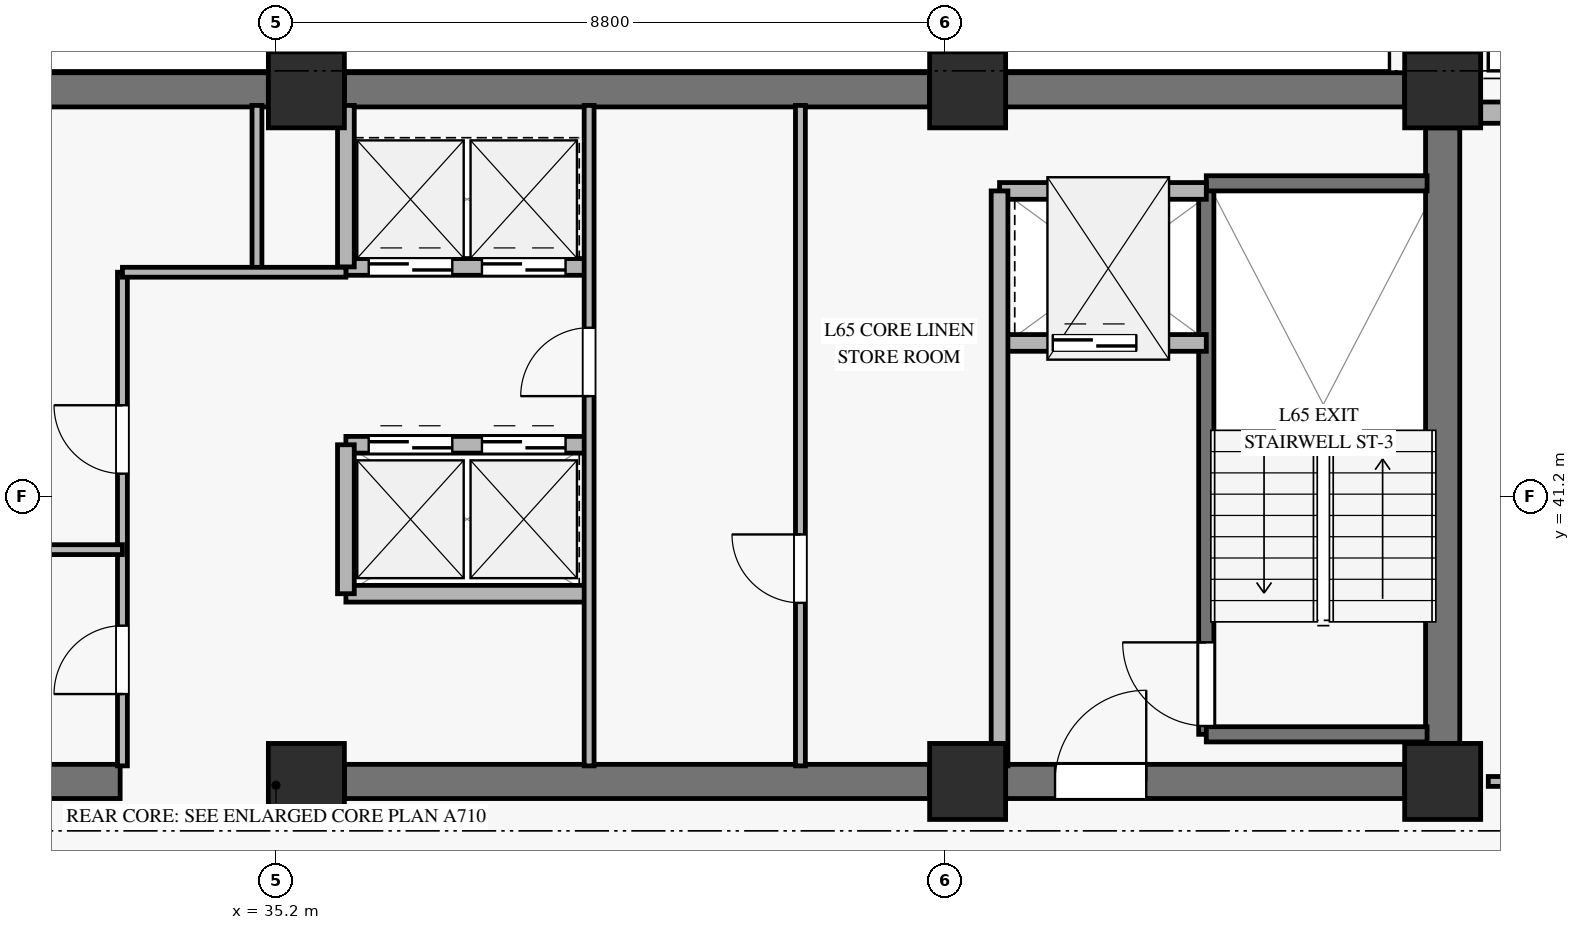
"""IFC4 building model, lengths in metres.
Left out: names, types, materials, properties, quantities, classifications, styles, units other than length and angle.
Written with IfcOpenShell. Run it as: python <this file> out.ifc"""

import sys

from ifc_helpers import new_model, si_unit, direction, frame, frame_2d, origin, origin_2d, place, context, subcontext, project, spatial, rectangle, extrude, source, transform, mapped, element, fill, save


model = new_model("IFC4")
c1 = context("Model", 3, precision=1e-05, world=origin(), true_north=direction((0.0, 1.0)))
c2 = subcontext(c1, "Body", "Model", "MODEL_VIEW")
j1 = project(units=[si_unit("LENGTHUNIT", "METRE"), si_unit("PLANEANGLEUNIT", "RADIAN")], contexts=[c1])
p1 = place(None, origin())
s1 = spatial("IfcSite", under=j1, at=p1, CompositionType="ELEMENT")
p2 = place(p1, origin())
s2 = spatial("IfcBuilding", under=s1, at=p2, CompositionType="ELEMENT")
p3 = place(p2, frame((0.0, 0.0, 255.3)))
s3 = spatial("IfcBuildingStorey", under=s2, at=p3, CompositionType="ELEMENT", Elevation=255.3)
m1 = source(origin(), c2, "Body", "SweptSolid", [
    extrude(rectangle(XDim=1.0, YDim=1.0, at=origin_2d()), origin(), (0.0, 0.0, 1.0), 3.185),
])
for number, where, z_axis, x_axis in (
    (1, (35.6, 37.45, 0.0), (0.0, 0.0, 1.0), (1.0, 0.0, 0.0)),
    (2, (35.6, 46.55, 0.0), (0.0, 0.0, 1.0), (1.0, 0.0, 0.0)),
    (3, (44.3, 37.45, 0.0), (0.0, 0.0, 1.0), (1.0, 0.0, 0.0)),
    (4, (44.3, 46.55, 0.0), (0.0, 0.0, 1.0), (1.0, 0.0, 0.0)),
    (5, (50.55, 37.45, 0.0), (0.0, 0.0, 1.0), (1.0, 0.0, 0.0)),
    (6, (50.55, 46.55, 0.0), (0.0, 0.0, 1.0), (1.0, 0.0, 0.0)),
):
    element("IfcColumn", number, at=place(p3, frame(where, z_axis=z_axis, x_axis=x_axis)), inside=s3, PredefinedType="PILASTER", context=c2, shape_type="MappedRepresentation", body=[
        mapped(m1, transform((0.0, 0.0, 0.0), x_axis=(1.0, 0.0, 0.0), y_axis=(0.0, 1.0, 0.0), z_axis=(0.0, 0.0, 1.0), scale=1.0)),
    ])
p4 = place(p3, frame((31.3, 46.55, 0.0), z_axis=(0.0, 0.0, 1.0), x_axis=(1.0, 0.0, 0.0)))
e7 = element("IfcWall", 7, at=p4, inside=s3, PredefinedType="SHEAR", context=c2, shape_type="SweptSolid", body=[
    extrude(rectangle(XDim=3.8, YDim=0.45, at=frame_2d((1.9, 0.0))), origin(), (0.0, 0.0, 1.0), 3.185),
])
p5 = place(p3, frame((36.1, 46.55, 0.0), z_axis=(0.0, 0.0, 1.0), x_axis=(1.0, 0.0, 0.0)))
e8 = element("IfcWall", 8, at=p5, inside=s3, PredefinedType="SHEAR", context=c2, shape_type="SweptSolid", body=[
    extrude(rectangle(XDim=7.7, YDim=0.45, at=frame_2d((3.85, 0.0))), origin(), (0.0, 0.0, 1.0), 3.185),
])
p6 = place(p3, frame((44.8, 46.55, 0.0), z_axis=(0.0, 0.0, 1.0), x_axis=(1.0, 0.0, 0.0)))
e9 = element("IfcWall", 9, at=p6, inside=s3, PredefinedType="SHEAR", context=c2, shape_type="SweptSolid", body=[
    extrude(rectangle(XDim=5.25, YDim=0.45, at=frame_2d((2.625, 0.0))), origin(), (0.0, 0.0, 1.0), 3.185),
])
p7 = place(p3, frame((31.3, 37.45, 0.0), z_axis=(0.0, 0.0, 1.0), x_axis=(1.0, 0.0, 0.0)))
e10 = element("IfcWall", 10, at=p7, inside=s3, PredefinedType="SHEAR", context=c2, shape_type="SweptSolid", body=[
    extrude(rectangle(XDim=1.85, YDim=0.45, at=frame_2d((0.925, 0.0))), origin(), (0.0, 0.0, 1.0), 3.185),
])
p8 = place(p3, frame((36.1, 37.45, 0.0), z_axis=(0.0, 0.0, 1.0), x_axis=(1.0, 0.0, 0.0)))
e11 = element("IfcWall", 11, at=p8, inside=s3, PredefinedType="SHEAR", context=c2, shape_type="SweptSolid", body=[
    extrude(rectangle(XDim=7.7, YDim=0.45, at=frame_2d((3.85, 0.0))), origin(), (0.0, 0.0, 1.0), 3.185),
])
p9 = place(p3, frame((44.8, 37.45, 0.0), z_axis=(0.0, 0.0, 1.0), x_axis=(1.0, 0.0, 0.0)))
e12 = element("IfcWall", 12, at=p9, inside=s3, PredefinedType="SHEAR", context=c2, shape_type="SweptSolid", body=[
    extrude(rectangle(XDim=5.25, YDim=0.45, at=frame_2d((2.625, 0.0))), origin(), (0.0, 0.0, 1.0), 3.185),
])
p10 = place(p9, frame((0.65, 0.0, 0.0)))
e13 = element("IfcOpeningElement", 13, at=p10, cuts=e12, PredefinedType="OPENING", context=c2, shape_type="SweptSolid", body=[
    extrude(rectangle(XDim=1.2, YDim=2.15, at=frame_2d((0.6, 1.075))), frame((0.0, 0.235, 0.0), z_axis=(0.0, -1.0, 0.0), x_axis=(1.0, 0.0, 0.0)), (0.0, 0.0, 1.0), 0.47),
])
p11 = place(p3, frame((50.55, 37.95, 0.0), z_axis=(0.0, 0.0, 1.0), x_axis=(0.0, 1.0, 0.0)))
e14 = element("IfcWall", 14, at=p11, inside=s3, PredefinedType="SHEAR", context=c2, shape_type="SweptSolid", body=[
    extrude(rectangle(XDim=8.1, YDim=0.45, at=frame_2d((4.05, 0.0))), origin(), (0.0, 0.0, 1.0), 3.185),
])
p12 = place(p3, frame((51.05, 46.25, 0.0), z_axis=(0.0, 0.0, 1.0), x_axis=(1.0, 0.0, 0.0)))
e15 = element("IfcWall", 15, at=p12, inside=s3, PredefinedType="SOLIDWALL", context=c2, shape_type="SweptSolid", body=[
    extrude(rectangle(XDim=8.122, YDim=0.28, at=frame_2d((4.061, 0.0))), origin(), (0.0, 0.0, 1.0), 2.815),
])
p13 = place(p12, frame((3.261, 0.0, 0.45)))
e16 = element("IfcOpeningElement", 16, at=p13, cuts=e15, PredefinedType="OPENING", context=c2, shape_type="SweptSolid", body=[
    extrude(rectangle(XDim=1.6, YDim=2.0, at=frame_2d((0.8, 1.0))), frame((0.0, 0.15, 0.0), z_axis=(0.0, -1.0, 0.0), x_axis=(1.0, 0.0, 0.0)), (0.0, 0.0, 1.0), 0.3),
])
p14 = place(p3, frame((47.44, 38.07, 0.0), z_axis=(0.0, 0.0, 1.0), x_axis=(0.0, 1.0, 0.0)))
e17 = element("IfcWall", 17, at=p14, inside=s3, PredefinedType="SOLIDWALL", context=c2, shape_type="SweptSolid", body=[
    extrude(rectangle(XDim=7.25, YDim=0.2, at=frame_2d((3.625, 0.0))), origin(), (0.0, 0.0, 1.0), 3.4),
])
p15 = place(p14, frame((0.11, 0.0, 0.0)))
e18 = element("IfcOpeningElement", 18, at=p15, cuts=e17, PredefinedType="OPENING", context=c2, shape_type="SweptSolid", body=[
    extrude(rectangle(XDim=1.1, YDim=2.15, at=frame_2d((0.55, 1.075))), frame((0.0, 0.11, 0.0), z_axis=(0.0, -1.0, 0.0), x_axis=(1.0, 0.0, 0.0)), (0.0, 0.0, 1.0), 0.22),
])
for number, where, z_axis, x_axis in (
    (19, (47.44, 45.32, 0.0), (0.0, 0.0, 1.0), (1.0, 0.0, 0.0)),
    (20, (47.44, 38.07, 0.0), (0.0, 0.0, 1.0), (1.0, 0.0, 0.0)),
):
    element("IfcWall", number, at=place(p3, frame(where, z_axis=z_axis, x_axis=x_axis)), inside=s3, PredefinedType="SOLIDWALL", context=c2, shape_type="SweptSolid", body=[
        extrude(rectangle(XDim=2.905, YDim=0.2, at=frame_2d((1.453, 0.0))), origin(), (0.0, 0.0, 1.0), 3.4),
    ])
p16 = place(p3, frame((44.72, 43.22, 0.0), z_axis=(0.0, 0.0, 1.0), x_axis=(1.0, 0.0, 0.0)))
e21 = element("IfcWall", 21, at=p16, inside=s3, PredefinedType="SOLIDWALL", context=c2, shape_type="SweptSolid", body=[
    extrude(rectangle(XDim=2.72, YDim=0.22, at=frame_2d((1.36, 0.0))), origin(), (0.0, 0.0, 1.0), 3.185),
])
p17 = place(p16, frame((0.7, 0.0, 0.0)))
e22 = element("IfcOpeningElement", 22, at=p17, cuts=e21, PredefinedType="OPENING", context=c2, shape_type="SweptSolid", body=[
    extrude(rectangle(XDim=1.1, YDim=2.2, at=frame_2d((0.55, 1.1))), frame((0.0, 0.12, 0.0), z_axis=(0.0, -1.0, 0.0), x_axis=(1.0, 0.0, 0.0)), (0.0, 0.0, 1.0), 0.24),
])
p18 = place(p3, frame((44.72, 45.22, 0.0), z_axis=(0.0, 0.0, 1.0), x_axis=(1.0, 0.0, 0.0)))
e23 = element("IfcWall", 23, at=p18, inside=s3, PredefinedType="SOLIDWALL", context=c2, shape_type="SweptSolid", body=[
    extrude(rectangle(XDim=2.72, YDim=0.22, at=frame_2d((1.36, 0.0))), origin(), (0.0, 0.0, 1.0), 3.185),
])
p19 = place(p3, frame((44.72, 37.655, 0.0), z_axis=(0.0, 0.0, 1.0), x_axis=(0.0, 1.0, 0.0)))
e24 = element("IfcWall", 24, at=p19, inside=s3, PredefinedType="SOLIDWALL", context=c2, shape_type="SweptSolid", body=[
    extrude(rectangle(XDim=7.565, YDim=0.22, at=frame_2d((3.782, 0.0))), origin(), (0.0, 0.0, 1.0), 3.185),
])
p20 = place(p3, frame((36.12, 44.22, 0.0), z_axis=(0.0, 0.0, 1.0), x_axis=(1.0, 0.0, 0.0)))
e25 = element("IfcWall", 25, at=p20, inside=s3, PredefinedType="SOLIDWALL", context=c2, shape_type="SweptSolid", body=[
    extrude(rectangle(XDim=3.2, YDim=0.22, at=frame_2d((1.6, 0.0))), origin(), (0.0, 0.0, 1.0), 3.185),
])
p21 = place(p20, frame((0.3, 0.0, 0.0)))
e26 = element("IfcOpeningElement", 26, at=p21, cuts=e25, PredefinedType="OPENING", context=c2, shape_type="SweptSolid", body=[
    extrude(rectangle(XDim=1.1, YDim=2.2, at=frame_2d((0.55, 1.1))), frame((0.0, 0.12, 0.0), z_axis=(0.0, -1.0, 0.0), x_axis=(1.0, 0.0, 0.0)), (0.0, 0.0, 1.0), 0.24),
])
p22 = place(p20, frame((1.79, 0.0, 0.0)))
e27 = element("IfcOpeningElement", 27, at=p22, cuts=e25, PredefinedType="OPENING", context=c2, shape_type="SweptSolid", body=[
    extrude(rectangle(XDim=1.1, YDim=2.2, at=frame_2d((0.55, 1.1))), frame((0.0, 0.12, 0.0), z_axis=(0.0, -1.0, 0.0), x_axis=(1.0, 0.0, 0.0)), (0.0, 0.0, 1.0), 0.24),
])
p23 = place(p3, frame((36.12, 41.88, 0.0), z_axis=(0.0, 0.0, 1.0), x_axis=(1.0, 0.0, 0.0)))
e28 = element("IfcWall", 28, at=p23, inside=s3, PredefinedType="SOLIDWALL", context=c2, shape_type="SweptSolid", body=[
    extrude(rectangle(XDim=3.2, YDim=0.22, at=frame_2d((1.6, 0.0))), origin(), (0.0, 0.0, 1.0), 3.185),
])
p24 = place(p23, frame((0.3, 0.0, 0.0)))
e29 = element("IfcOpeningElement", 29, at=p24, cuts=e28, PredefinedType="OPENING", context=c2, shape_type="SweptSolid", body=[
    extrude(rectangle(XDim=1.1, YDim=2.2, at=frame_2d((0.55, 1.1))), frame((0.0, 0.12, 0.0), z_axis=(0.0, -1.0, 0.0), x_axis=(1.0, 0.0, 0.0)), (0.0, 0.0, 1.0), 0.24),
])
p25 = place(p23, frame((1.79, 0.0, 0.0)))
e30 = element("IfcOpeningElement", 30, at=p25, cuts=e28, PredefinedType="OPENING", context=c2, shape_type="SweptSolid", body=[
    extrude(rectangle(XDim=1.1, YDim=2.2, at=frame_2d((0.55, 1.1))), frame((0.0, 0.12, 0.0), z_axis=(0.0, -1.0, 0.0), x_axis=(1.0, 0.0, 0.0)), (0.0, 0.0, 1.0), 0.24),
])
p26 = place(p3, frame((36.12, 39.92, 0.0), z_axis=(0.0, 0.0, 1.0), x_axis=(1.0, 0.0, 0.0)))
e31 = element("IfcWall", 31, at=p26, inside=s3, PredefinedType="SOLIDWALL", context=c2, shape_type="SweptSolid", body=[
    extrude(rectangle(XDim=3.2, YDim=0.22, at=frame_2d((1.6, 0.0))), origin(), (0.0, 0.0, 1.0), 3.185),
])
p27 = place(p3, frame((36.12, 39.92, 0.0), z_axis=(0.0, 0.0, 1.0), x_axis=(0.0, 1.0, 0.0)))
e32 = element("IfcWall", 32, at=p27, inside=s3, PredefinedType="SOLIDWALL", context=c2, shape_type="SweptSolid", body=[
    extrude(rectangle(XDim=1.96, YDim=0.22, at=frame_2d((0.98, 0.0))), origin(), (0.0, 0.0, 1.0), 3.185),
])
p28 = place(p3, frame((36.12, 44.22, 0.0), z_axis=(0.0, 0.0, 1.0), x_axis=(0.0, 1.0, 0.0)))
e33 = element("IfcWall", 33, at=p28, inside=s3, PredefinedType="SOLIDWALL", context=c2, shape_type="SweptSolid", body=[
    extrude(rectangle(XDim=2.125, YDim=0.22, at=frame_2d((1.062, 0.0))), origin(), (0.0, 0.0, 1.0), 3.185),
])
p29 = place(p3, frame((33.18, 37.655, 0.0), z_axis=(0.0, 0.0, 1.0), x_axis=(0.0, 1.0, 0.0)))
e34 = element("IfcWall", 34, at=p29, inside=s3, PredefinedType="PARTITIONING", context=c2, shape_type="SweptSolid", body=[
    extrude(rectangle(XDim=6.495, YDim=0.13, at=frame_2d((3.248, 0.0))), origin(), (0.0, 0.0, 1.0), 2.27),
])
p30 = place(p29, frame((0.945, 0.0, 0.0)))
e35 = element("IfcOpeningElement", 35, at=p30, cuts=e34, PredefinedType="OPENING", context=c2, shape_type="SweptSolid", body=[
    extrude(rectangle(XDim=0.9, YDim=2.1, at=frame_2d((0.45, 1.05))), frame((0.0, 0.075, 0.0), z_axis=(0.0, -1.0, 0.0), x_axis=(1.0, 0.0, 0.0)), (0.0, 0.0, 1.0), 0.15),
])
p31 = place(p29, frame((3.845, 0.0, 0.0)))
e36 = element("IfcOpeningElement", 36, at=p31, cuts=e34, PredefinedType="OPENING", context=c2, shape_type="SweptSolid", body=[
    extrude(rectangle(XDim=0.9, YDim=2.1, at=frame_2d((0.45, 1.05))), frame((0.0, 0.075, 0.0), z_axis=(0.0, -1.0, 0.0), x_axis=(1.0, 0.0, 0.0)), (0.0, 0.0, 1.0), 0.15),
])
p32 = place(p3, frame((34.95, 44.15, 0.0), z_axis=(0.0, 0.0, 1.0), x_axis=(0.0, 1.0, 0.0)))
e37 = element("IfcWall", 37, at=p32, inside=s3, PredefinedType="PARTITIONING", context=c2, shape_type="SweptSolid", body=[
    extrude(rectangle(XDim=2.195, YDim=0.13, at=frame_2d((1.098, 0.0))), origin(), (0.0, 0.0, 1.0), 3.185),
])
p33 = place(p3, frame((33.18, 44.15, 0.0), z_axis=(0.0, 0.0, 1.0), x_axis=(1.0, 0.0, 0.0)))
e38 = element("IfcWall", 38, at=p33, inside=s3, PredefinedType="PARTITIONING", context=c2, shape_type="SweptSolid", body=[
    extrude(rectangle(XDim=2.94, YDim=0.13, at=frame_2d((1.47, 0.0))), origin(), (0.0, 0.0, 1.0), 2.47),
])
p34 = place(p3, frame((39.32, 37.655, 0.0), z_axis=(0.0, 0.0, 1.0), x_axis=(0.0, 1.0, 0.0)))
e39 = element("IfcWall", 39, at=p34, inside=s3, PredefinedType="PARTITIONING", context=c2, shape_type="SweptSolid", body=[
    extrude(rectangle(XDim=8.69, YDim=0.13, at=frame_2d((4.345, 0.0))), origin(), (0.0, 0.0, 1.0), 3.185),
])
p35 = place(p34, frame((4.865, 0.0, 0.0)))
e40 = element("IfcOpeningElement", 40, at=p35, cuts=e39, PredefinedType="OPENING", context=c2, shape_type="SweptSolid", body=[
    extrude(rectangle(XDim=0.9, YDim=2.1, at=frame_2d((0.45, 1.05))), frame((0.0, 0.075, 0.0), z_axis=(0.0, -1.0, 0.0), x_axis=(1.0, 0.0, 0.0)), (0.0, 0.0, 1.0), 0.15),
])
p36 = place(p3, frame((30.22, 40.5, 0.0), z_axis=(0.0, 0.0, 1.0), x_axis=(1.0, 0.0, 0.0)))
e41 = element("IfcWall", 41, at=p36, inside=s3, PredefinedType="PARTITIONING", context=c2, shape_type="SweptSolid", body=[
    extrude(rectangle(XDim=2.96, YDim=0.13, at=frame_2d((1.48, 0.0))), origin(), (0.0, 0.0, 1.0), 2.47),
])
p37 = place(p3, frame((42.1, 37.655, 0.0), z_axis=(0.0, 0.0, 1.0), x_axis=(0.0, 1.0, 0.0)))
e42 = element("IfcWall", 42, at=p37, inside=s3, PredefinedType="PARTITIONING", context=c2, shape_type="SweptSolid", body=[
    extrude(rectangle(XDim=8.69, YDim=0.13, at=frame_2d((4.345, 0.0))), origin(), (0.0, 0.0, 1.0), 3.185),
])
p38 = place(p37, frame((2.145, 0.0, 0.0)))
e43 = element("IfcOpeningElement", 43, at=p38, cuts=e42, PredefinedType="OPENING", context=c2, shape_type="SweptSolid", body=[
    extrude(rectangle(XDim=0.9, YDim=2.1, at=frame_2d((0.45, 1.05))), frame((0.0, 0.075, 0.0), z_axis=(0.0, -1.0, 0.0), x_axis=(1.0, 0.0, 0.0)), (0.0, 0.0, 1.0), 0.15),
])
p39 = place(p3, frame((51.15, 37.45, 0.0), z_axis=(0.0, 0.0, 1.0), x_axis=(1.0, 0.0, 0.0)))
e44 = element("IfcWall", 44, at=p39, inside=s3, PredefinedType="PARTITIONING", context=c2, shape_type="SweptSolid", body=[
    extrude(rectangle(XDim=10.887, YDim=0.13, at=frame_2d((5.444, 0.0))), origin(), (0.0, 0.0, 1.0), 2.82),
])
p40 = place(p39, frame((0.5, 0.0, 0.0)))
e45 = element("IfcOpeningElement", 45, at=p40, cuts=e44, PredefinedType="OPENING", context=c2, shape_type="SweptSolid", body=[
    extrude(rectangle(XDim=0.9, YDim=2.1, at=frame_2d((0.45, 1.05))), frame((0.0, 0.075, 0.0), z_axis=(0.0, -1.0, 0.0), x_axis=(1.0, 0.0, 0.0)), (0.0, 0.0, 1.0), 0.15),
])
p41 = place(p39, frame((7.77, 0.0, 0.0)))
e46 = element("IfcOpeningElement", 46, at=p41, cuts=e44, PredefinedType="OPENING", context=c2, shape_type="SweptSolid", body=[
    extrude(rectangle(XDim=0.95, YDim=2.1, at=frame_2d((0.475, 1.05))), frame((0.0, 0.075, 0.0), z_axis=(0.0, -1.0, 0.0), x_axis=(1.0, 0.0, 0.0)), (0.0, 0.0, 1.0), 0.15),
])
m2 = source(origin(), c2, "Body", "SweptSolid", [
    extrude(rectangle(XDim=1.1, YDim=2.15, at=frame_2d((0.55, 1.075))), frame((0.0, 0.025, 0.0), z_axis=(0.0, -1.0, 0.0), x_axis=(1.0, 0.0, 0.0)), (0.0, 0.0, 1.0), 0.05),
])
p42 = place(p15, origin())
e47 = element("IfcDoor", 47, at=p42, inside=s3, OperationType="SINGLE_SWING_RIGHT", PredefinedType="DOOR", context=c2, shape_type="MappedRepresentation", body=[
    mapped(m2, transform((0.0, 0.0, 0.0), x_axis=(1.0, 0.0, 0.0), y_axis=(0.0, 1.0, 0.0), z_axis=(0.0, 0.0, 1.0), scale=1.0)),
])
fill(e18, e47)
m3 = source(origin(), c2, "Body", "SweptSolid", [
    extrude(rectangle(XDim=1.1, YDim=2.2, at=frame_2d((0.55, 1.1))), frame((0.0, 0.025, 0.0), z_axis=(0.0, -1.0, 0.0), x_axis=(1.0, 0.0, 0.0)), (0.0, 0.0, 1.0), 0.05),
])
p43 = place(p17, origin())
e48 = element("IfcDoor", 48, at=p43, inside=s3, OperationType="SLIDING_TO_LEFT", PredefinedType="DOOR", context=c2, shape_type="MappedRepresentation", body=[
    mapped(m3, transform((0.0, 0.0, 0.0), x_axis=(1.0, 0.0, 0.0), y_axis=(0.0, 1.0, 0.0), z_axis=(0.0, 0.0, 1.0), scale=1.0)),
])
fill(e22, e48)
m4 = source(origin(), c2, "Body", "SweptSolid", [
    extrude(rectangle(XDim=1.2, YDim=2.15, at=frame_2d((0.6, 1.075))), frame((0.0, 0.025, 0.0), z_axis=(0.0, -1.0, 0.0), x_axis=(1.0, 0.0, 0.0)), (0.0, 0.0, 1.0), 0.05),
])
p44 = place(p10, origin())
e49 = element("IfcDoor", 49, at=p44, inside=s3, OperationType="SINGLE_SWING_RIGHT", PredefinedType="DOOR", context=c2, shape_type="MappedRepresentation", body=[
    mapped(m4, transform((0.0, 0.0, 0.0), x_axis=(1.0, 0.0, 0.0), y_axis=(0.0, 1.0, 0.0), z_axis=(0.0, 0.0, 1.0), scale=1.0)),
])
fill(e13, e49)
p45 = place(p21, origin())
e50 = element("IfcDoor", 50, at=p45, inside=s3, OperationType="SLIDING_TO_LEFT", PredefinedType="DOOR", context=c2, shape_type="MappedRepresentation", body=[
    mapped(m3, transform((0.0, 0.0, 0.0), x_axis=(1.0, 0.0, 0.0), y_axis=(0.0, 1.0, 0.0), z_axis=(0.0, 0.0, 1.0), scale=1.0)),
])
fill(e26, e50)
p46 = place(p22, origin())
e51 = element("IfcDoor", 51, at=p46, inside=s3, OperationType="SLIDING_TO_LEFT", PredefinedType="DOOR", context=c2, shape_type="MappedRepresentation", body=[
    mapped(m3, transform((0.0, 0.0, 0.0), x_axis=(1.0, 0.0, 0.0), y_axis=(0.0, 1.0, 0.0), z_axis=(0.0, 0.0, 1.0), scale=1.0)),
])
fill(e27, e51)
p47 = place(p24, origin())
e52 = element("IfcDoor", 52, at=p47, inside=s3, OperationType="SLIDING_TO_LEFT", PredefinedType="DOOR", context=c2, shape_type="MappedRepresentation", body=[
    mapped(m3, transform((0.0, 0.0, 0.0), x_axis=(1.0, 0.0, 0.0), y_axis=(0.0, 1.0, 0.0), z_axis=(0.0, 0.0, 1.0), scale=1.0)),
])
fill(e29, e52)
p48 = place(p25, origin())
e53 = element("IfcDoor", 53, at=p48, inside=s3, OperationType="SLIDING_TO_LEFT", PredefinedType="DOOR", context=c2, shape_type="MappedRepresentation", body=[
    mapped(m3, transform((0.0, 0.0, 0.0), x_axis=(1.0, 0.0, 0.0), y_axis=(0.0, 1.0, 0.0), z_axis=(0.0, 0.0, 1.0), scale=1.0)),
])
fill(e30, e53)
m5 = source(origin(), c2, "Body", "SweptSolid", [
    extrude(rectangle(XDim=0.9, YDim=2.1, at=frame_2d((0.45, 1.05))), frame((0.0, 0.025, 0.0), z_axis=(0.0, -1.0, 0.0), x_axis=(1.0, 0.0, 0.0)), (0.0, 0.0, 1.0), 0.05),
])
p49 = place(p30, origin())
e54 = element("IfcDoor", 54, at=p49, inside=s3, OperationType="SINGLE_SWING_LEFT", PredefinedType="DOOR", context=c2, shape_type="MappedRepresentation", body=[
    mapped(m5, transform((0.0, 0.0, 0.0), x_axis=(1.0, 0.0, 0.0), y_axis=(0.0, 1.0, 0.0), z_axis=(0.0, 0.0, 1.0), scale=1.0)),
])
fill(e35, e54)
p50 = place(p31, origin())
e55 = element("IfcDoor", 55, at=p50, inside=s3, OperationType="SINGLE_SWING_RIGHT", PredefinedType="DOOR", context=c2, shape_type="MappedRepresentation", body=[
    mapped(m5, transform((0.0, 0.0, 0.0), x_axis=(1.0, 0.0, 0.0), y_axis=(0.0, 1.0, 0.0), z_axis=(0.0, 0.0, 1.0), scale=1.0)),
])
fill(e36, e55)
p51 = place(p35, origin())
e56 = element("IfcDoor", 56, at=p51, inside=s3, OperationType="SINGLE_SWING_LEFT", PredefinedType="DOOR", context=c2, shape_type="MappedRepresentation", body=[
    mapped(m5, transform((0.0, 0.0, 0.0), x_axis=(1.0, 0.0, 0.0), y_axis=(0.0, 1.0, 0.0), z_axis=(0.0, 0.0, 1.0), scale=1.0)),
])
fill(e40, e56)
p52 = place(p38, origin())
e57 = element("IfcDoor", 57, at=p52, inside=s3, OperationType="SINGLE_SWING_RIGHT", PredefinedType="DOOR", context=c2, shape_type="MappedRepresentation", body=[
    mapped(m5, transform((0.0, 0.0, 0.0), x_axis=(1.0, 0.0, 0.0), y_axis=(0.0, 1.0, 0.0), z_axis=(0.0, 0.0, 1.0), scale=1.0)),
])
fill(e43, e57)
save(model, sys.argv[1])
